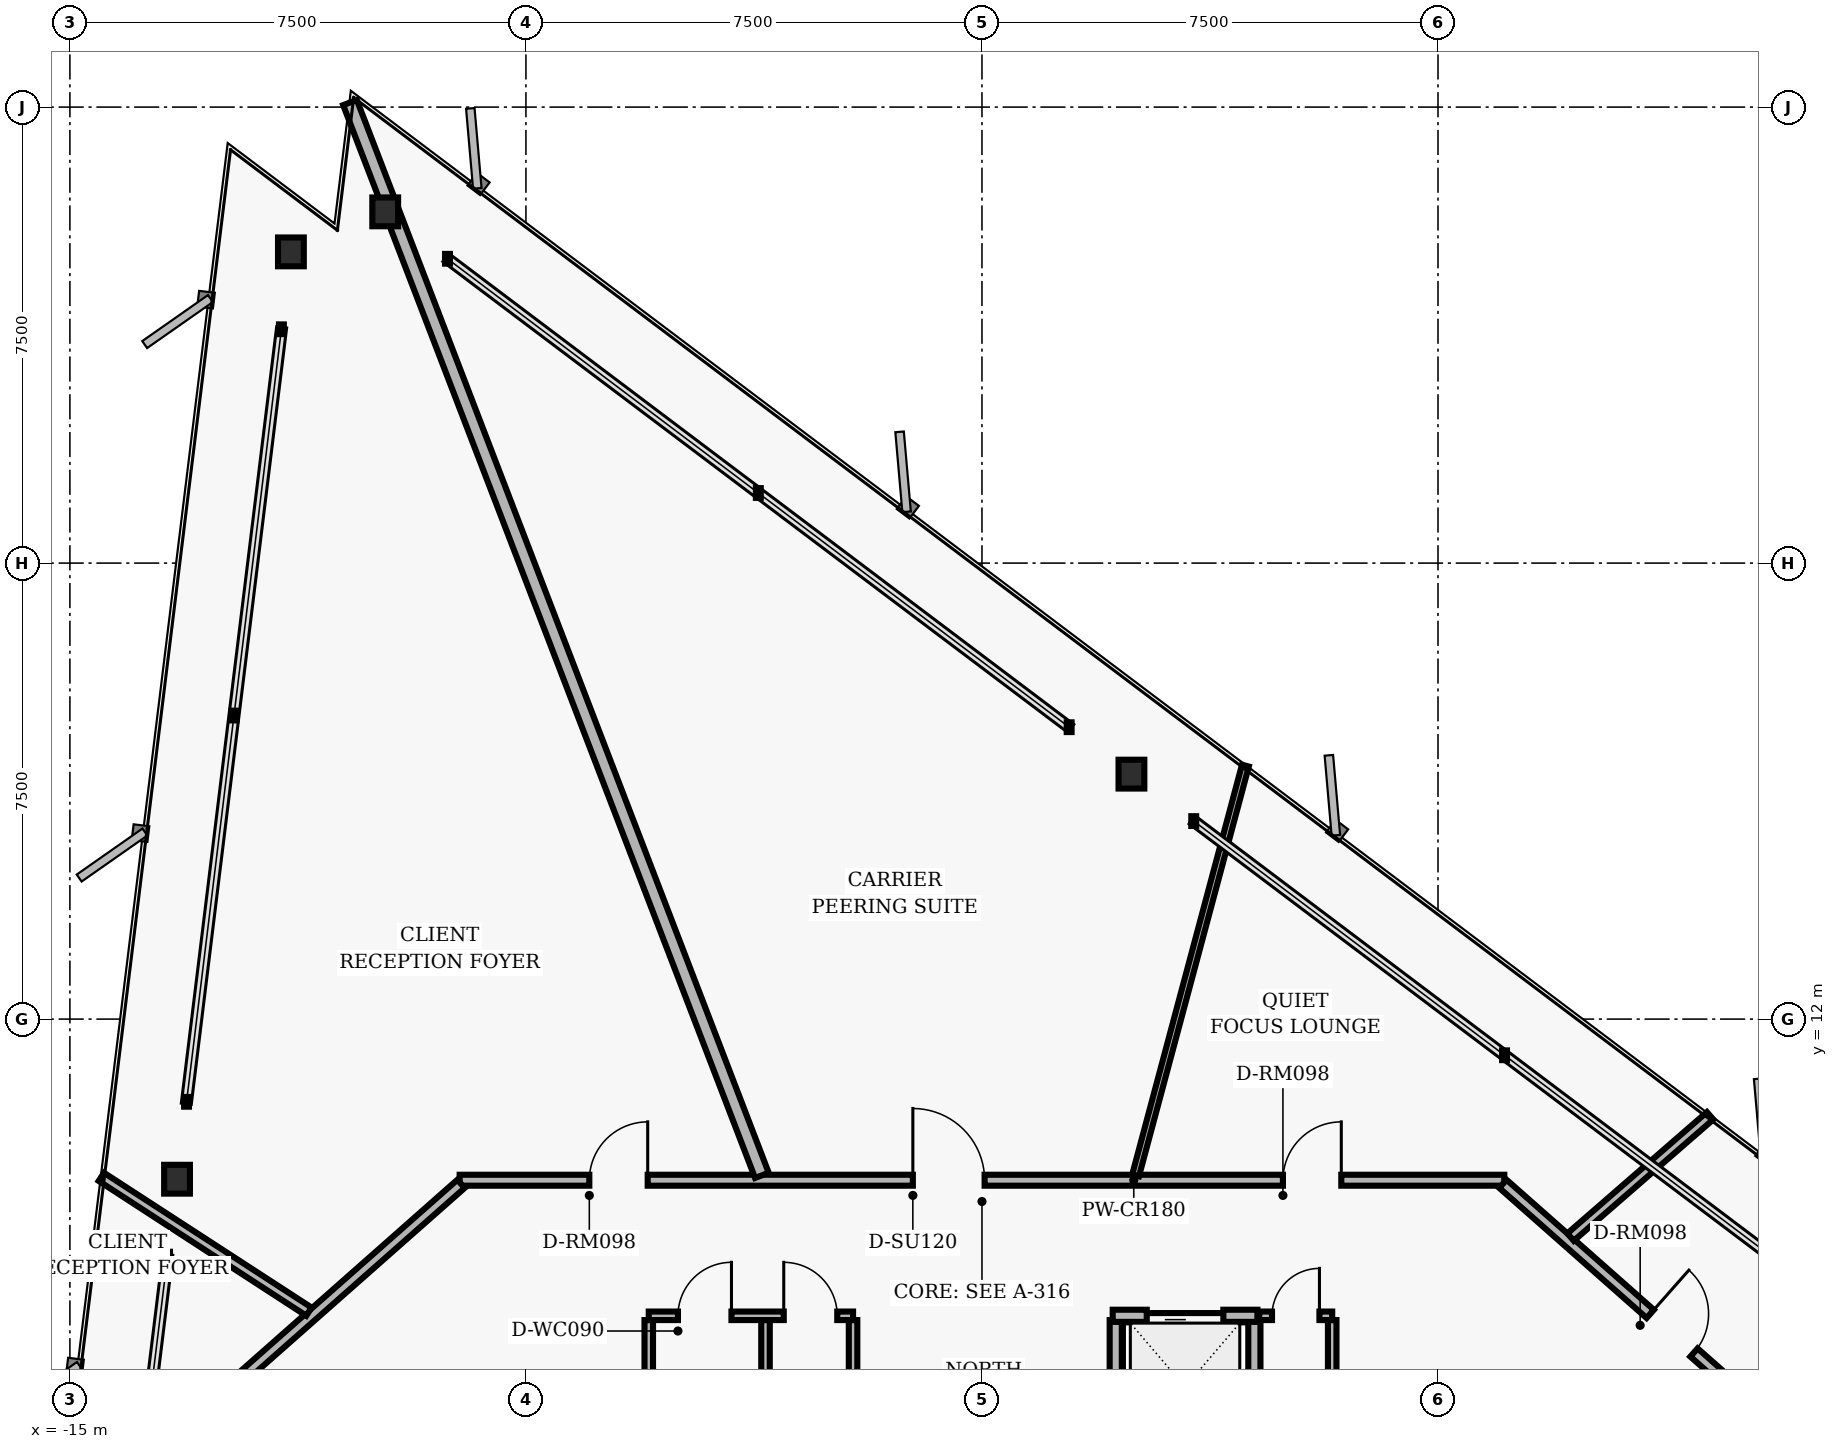
"""IFC4 building model, lengths in metres.
Left out: names, types, materials, properties, quantities, classifications, styles, units other than length and angle.
Written with IfcOpenShell. Run it as: python <this file> out.ifc"""

import sys

from ifc_helpers import new_model, si_unit, direction, frame, frame_2d, origin, origin_2d, place, context, subcontext, project, spatial, rectangle, i_section, extrude, element, fill, save


model = new_model("IFC4")
c1 = context("Model", 3, precision=1e-05, world=origin(), true_north=direction((0.0, 1.0)))
c2 = subcontext(c1, "Body", "Model", "MODEL_VIEW")
j1 = project(units=[si_unit("LENGTHUNIT", "METRE"), si_unit("PLANEANGLEUNIT", "RADIAN")], contexts=[c1])
p1 = place(None, origin())
s1 = spatial("IfcSite", under=j1, at=p1, CompositionType="ELEMENT")
p2 = place(p1, origin())
s2 = spatial("IfcBuilding", under=s1, at=p2, CompositionType="ELEMENT")
p3 = place(p2, frame((0.0, 0.0, 59.68)))
s3 = spatial("IfcBuildingStorey", under=s2, at=p3, CompositionType="ELEMENT", Elevation=59.68)
for number, where, z_axis, x_axis in (
    (1, (2.458, 16.029, 0.0), (0.0, 0.0, 1.0), (1.0, 0.0, 0.0)),
    (2, (-9.814, 25.277, 0.0), (0.0, 0.0, 1.0), (1.0, 0.0, 0.0)),
    (3, (-11.365, 24.619, 0.0), (0.0, 0.0, 1.0), (1.0, 0.0, 0.0)),
    (4, (-13.238, 9.366, 0.0), (0.0, 0.0, 1.0), (1.0, 0.0, 0.0)),
):
    element("IfcColumn", number, at=place(p3, frame(where, z_axis=z_axis, x_axis=x_axis)), inside=s3, PredefinedType="COLUMN", context=c2, shape_type="SweptSolid", body=[
        extrude(i_section(OverallWidth=0.424, OverallDepth=0.474, WebThickness=0.048, FlangeThickness=0.077, FilletRadius=0.025, at=origin_2d()), origin(), (0.0, 0.0, 1.0), 3.36),
    ])
for number, where, z_axis, x_axis in (
    (5, (2.2, 4.95, 0.0), (0.0, 0.0, 1.0), (0.0, 1.0, 0.0)),
    (6, (4.48, 4.95, 0.0), (0.0, 0.0, 1.0), (0.0, 1.0, 0.0)),
):
    element("IfcWall", number, at=place(p3, frame(where, z_axis=z_axis, x_axis=x_axis)), inside=s3, PredefinedType="PARTITIONING", context=c2, shape_type="SweptSolid", body=[
        extrude(rectangle(XDim=2.1, YDim=0.2, at=frame_2d((1.05, 0.0))), origin(), (0.0, 0.0, 1.0), 3.073),
    ])
p4 = place(p3, frame((2.15, 7.12, 0.0), z_axis=(0.0, 0.0, 1.0), x_axis=(1.0, 0.0, 0.0)))
e7 = element("IfcWall", 7, at=p4, inside=s3, PredefinedType="PARTITIONING", context=c2, shape_type="SweptSolid", body=[
    extrude(rectangle(XDim=2.38, YDim=0.2, at=frame_2d((1.19, 0.0))), origin(), (0.0, 0.0, 1.0), 2.587),
])
p5 = place(p4, frame((0.56, 0.0, 0.0)))
e8 = element("IfcOpeningElement", 8, at=p5, cuts=e7, PredefinedType="OPENING", context=c2, shape_type="SweptSolid", body=[
    extrude(rectangle(XDim=1.26, YDim=2.06, at=frame_2d((0.63, 1.03))), frame((0.0, 0.11, 0.0), z_axis=(0.0, -1.0, 0.0), x_axis=(1.0, 0.0, 0.0)), (0.0, 0.0, 1.0), 0.22),
])
for number, where, z_axis, x_axis in (
    (9, (-5.48, 4.95, 0.0), (0.0, 0.0, 1.0), (0.0, 1.0, 0.0)),
    (10, (-3.56, 4.95, 0.0), (0.0, 0.0, 1.0), (0.0, 1.0, 0.0)),
    (11, (-2.12, 4.95, 0.0), (0.0, 0.0, 1.0), (0.0, 1.0, 0.0)),
):
    element("IfcWall", number, at=place(p3, frame(where, z_axis=z_axis, x_axis=x_axis)), inside=s3, PredefinedType="PARTITIONING", context=c2, shape_type="SweptSolid", body=[
        extrude(rectangle(XDim=2.1, YDim=0.14, at=frame_2d((1.05, 0.0))), origin(), (0.0, 0.0, 1.0), 3.073),
    ])
p6 = place(p3, frame((-5.48, 7.12, 0.0), z_axis=(0.0, 0.0, 1.0), x_axis=(1.0, 0.0, 0.0)))
e12 = element("IfcWall", 12, at=p6, inside=s3, PredefinedType="PARTITIONING", context=c2, shape_type="SweptSolid", body=[
    extrude(rectangle(XDim=3.36, YDim=0.14, at=frame_2d((1.68, 0.0))), origin(), (0.0, 0.0, 1.0), 3.073),
])
p7 = place(p6, frame((0.48, 0.0, 0.0)))
e13 = element("IfcOpeningElement", 13, at=p7, cuts=e12, PredefinedType="OPENING", context=c2, shape_type="SweptSolid", body=[
    extrude(rectangle(XDim=0.88, YDim=2.02, at=frame_2d((0.44, 1.01))), frame((0.0, 0.08, 0.0), z_axis=(0.0, -1.0, 0.0), x_axis=(1.0, 0.0, 0.0)), (0.0, 0.0, 1.0), 0.16),
])
p8 = place(p6, frame((2.22, 0.0, 0.0)))
e14 = element("IfcOpeningElement", 14, at=p8, cuts=e12, PredefinedType="OPENING", context=c2, shape_type="SweptSolid", body=[
    extrude(rectangle(XDim=0.88, YDim=2.02, at=frame_2d((0.44, 1.01))), frame((0.0, 0.08, 0.0), z_axis=(0.0, -1.0, 0.0), x_axis=(1.0, 0.0, 0.0)), (0.0, 0.0, 1.0), 0.16),
])
p9 = place(p3, frame((5.76, 4.95, 0.0), z_axis=(0.0, 0.0, 1.0), x_axis=(0.0, 1.0, 0.0)))
e15 = element("IfcWall", 15, at=p9, inside=s3, PredefinedType="PARTITIONING", context=c2, shape_type="SweptSolid", body=[
    extrude(rectangle(XDim=2.1, YDim=0.14, at=frame_2d((1.05, 0.0))), origin(), (0.0, 0.0, 1.0), 3.073),
])
p10 = place(p3, frame((4.56, 7.12, 0.0), z_axis=(0.0, 0.0, 1.0), x_axis=(1.0, 0.0, 0.0)))
e16 = element("IfcWall", 16, at=p10, inside=s3, PredefinedType="PARTITIONING", context=c2, shape_type="SweptSolid", body=[
    extrude(rectangle(XDim=1.2, YDim=0.14, at=frame_2d((0.6, 0.0))), origin(), (0.0, 0.0, 1.0), 2.587),
])
p11 = place(p10, frame((0.21, 0.0, 0.0)))
e17 = element("IfcOpeningElement", 17, at=p11, cuts=e16, PredefinedType="OPENING", context=c2, shape_type="SweptSolid", body=[
    extrude(rectangle(XDim=0.78, YDim=2.01, at=frame_2d((0.39, 1.005))), frame((0.0, 0.08, 0.0), z_axis=(0.0, -1.0, 0.0), x_axis=(1.0, 0.0, 0.0)), (0.0, 0.0, 1.0), 0.16),
])
p12 = place(p3, frame((-8.59, 9.35, 0.0), z_axis=(0.0, 0.0, 1.0), x_axis=(1.0, 0.0, 0.0)))
e18 = element("IfcWall", 18, at=p12, inside=s3, PredefinedType="PARTITIONING", context=c2, shape_type="SweptSolid", body=[
    extrude(rectangle(XDim=17.18, YDim=0.18, at=frame_2d((8.59, 0.0))), origin(), (0.0, 0.0, 1.0), 3.073),
])
p13 = place(p12, frame((13.54, 0.0, 0.0)))
e19 = element("IfcOpeningElement", 19, at=p13, cuts=e18, PredefinedType="OPENING", context=c2, shape_type="SweptSolid", body=[
    extrude(rectangle(XDim=0.96, YDim=2.02, at=frame_2d((0.48, 1.01))), frame((0.0, 0.1, 0.0), z_axis=(0.0, -1.0, 0.0), x_axis=(1.0, 0.0, 0.0)), (0.0, 0.0, 1.0), 0.2),
])
p14 = place(p12, frame((7.453, 0.0, 0.0)))
e20 = element("IfcOpeningElement", 20, at=p14, cuts=e18, PredefinedType="OPENING", context=c2, shape_type="SweptSolid", body=[
    extrude(rectangle(XDim=1.18, YDim=2.02, at=frame_2d((0.59, 1.01))), frame((0.0, 0.1, 0.0), z_axis=(0.0, -1.0, 0.0), x_axis=(1.0, 0.0, 0.0)), (0.0, 0.0, 1.0), 0.2),
])
p15 = place(p12, frame((2.133, 0.0, 0.0)))
e21 = element("IfcOpeningElement", 21, at=p15, cuts=e18, PredefinedType="OPENING", context=c2, shape_type="SweptSolid", body=[
    extrude(rectangle(XDim=0.96, YDim=2.02, at=frame_2d((0.48, 1.01))), frame((0.0, 0.1, 0.0), z_axis=(0.0, -1.0, 0.0), x_axis=(1.0, 0.0, 0.0)), (0.0, 0.0, 1.0), 0.2),
])
p16 = place(p3, frame((8.567, 9.29, 0.0), z_axis=(0.0, 0.0, 1.0), x_axis=(0.749626463267, -0.66186113768, 0.0)))
e22 = element("IfcWall", 22, at=p16, inside=s3, PredefinedType="PARTITIONING", context=c2, shape_type="SweptSolid", body=[
    extrude(rectangle(XDim=6.27, YDim=0.18, at=frame_2d((3.135, 0.0))), origin(), (0.0, 0.0, 1.0), 2.587),
])
p17 = place(p16, frame((3.232, 0.0, 0.0)))
e23 = element("IfcOpeningElement", 23, at=p17, cuts=e22, PredefinedType="OPENING", context=c2, shape_type="SweptSolid", body=[
    extrude(rectangle(XDim=0.96, YDim=2.02, at=frame_2d((0.48, 1.01))), frame((0.0, 0.1, 0.0), z_axis=(0.0, -1.0, 0.0), x_axis=(1.0, 0.0, 0.0)), (0.0, 0.0, 1.0), 0.2),
])
p18 = place(p3, frame((-13.268, 5.14, 0.0), z_axis=(0.0, 0.0, 1.0), x_axis=(0.749626463267, 0.66186113768, 0.0)))
e24 = element("IfcWall", 24, at=p18, inside=s3, PredefinedType="PARTITIONING", context=c2, shape_type="SweptSolid", body=[
    extrude(rectangle(XDim=6.27, YDim=0.18, at=frame_2d((3.135, 0.0))), origin(), (0.0, 0.0, 1.0), 3.073),
])
p19 = place(p3, frame((9.68, 8.415, 0.0), z_axis=(0.0, 0.0, 1.0), x_axis=(0.754716123846, 0.656051501337, 0.0)))
e25 = element("IfcWall", 25, at=p19, inside=s3, PredefinedType="PARTITIONING", context=c2, shape_type="SweptSolid", body=[
    extrude(rectangle(XDim=3.041, YDim=0.16, at=frame_2d((1.521, 0.0))), origin(), (0.0, 0.0, 1.0), 3.073),
])
p20 = place(p3, frame((2.527, 9.43, 0.0), z_axis=(0.0, 0.0, 1.0), x_axis=(0.258803716415, 0.965929933468, 0.0)))
e26 = element("IfcWall", 26, at=p20, inside=s3, PredefinedType="MOVABLE", context=c2, shape_type="SweptSolid", body=[
    extrude(rectangle(XDim=6.977, YDim=0.115, at=frame_2d((3.489, 0.0))), origin(), (0.0, 0.0, 1.0), 3.073),
])
p21 = place(p3, frame((-3.62, 9.43, 0.0), z_axis=(0.0, 0.0, 1.0), x_axis=(-0.358366182081, 0.933581104961, 0.0)))
e27 = element("IfcWall", 27, at=p21, inside=s3, PredefinedType="PARTITIONING", context=c2, shape_type="SweptSolid", body=[
    extrude(rectangle(XDim=18.901, YDim=0.24, at=frame_2d((9.45, 0.0))), origin(), (0.0, 0.0, 1.0), 3.073),
])
p22 = place(p3, frame((-11.069, 7.188, 0.0), z_axis=(0.0, 0.0, 1.0), x_axis=(-0.838653238926, 0.544665718436, 0.0)))
e28 = element("IfcWall", 28, at=p22, inside=s3, PredefinedType="PARTITIONING", context=c2, shape_type="SweptSolid", body=[
    extrude(rectangle(XDim=4.07, YDim=0.16, at=frame_2d((2.035, 0.0))), origin(), (0.0, 0.0, 1.0), 2.358),
])
p23 = place(p5, origin())
e29 = element("IfcDoor", 29, at=p23, inside=s3, OperationType="SLIDING_TO_LEFT", PredefinedType="DOOR", context=c2, shape_type="SweptSolid", body=[
    extrude(rectangle(XDim=1.26, YDim=2.06, at=frame_2d((0.63, 1.03))), frame((0.0, 0.025, 0.0), z_axis=(0.0, -1.0, 0.0), x_axis=(1.0, 0.0, 0.0)), (0.0, 0.0, 1.0), 0.05),
])
fill(e8, e29)
p24 = place(p7, origin())
e30 = element("IfcDoor", 30, at=p24, inside=s3, OperationType="SINGLE_SWING_RIGHT", PredefinedType="DOOR", context=c2, shape_type="SweptSolid", body=[
    extrude(rectangle(XDim=0.88, YDim=2.02, at=frame_2d((0.44, 1.01))), frame((0.0, 0.025, 0.0), z_axis=(0.0, -1.0, 0.0), x_axis=(1.0, 0.0, 0.0)), (0.0, 0.0, 1.0), 0.05),
])
fill(e13, e30)
p25 = place(p8, origin())
e31 = element("IfcDoor", 31, at=p25, inside=s3, OperationType="SINGLE_SWING_LEFT", PredefinedType="DOOR", context=c2, shape_type="SweptSolid", body=[
    extrude(rectangle(XDim=0.88, YDim=2.02, at=frame_2d((0.44, 1.01))), frame((0.0, 0.025, 0.0), z_axis=(0.0, -1.0, 0.0), x_axis=(1.0, 0.0, 0.0)), (0.0, 0.0, 1.0), 0.05),
])
fill(e14, e31)
p26 = place(p11, origin())
e32 = element("IfcDoor", 32, at=p26, inside=s3, OperationType="SINGLE_SWING_RIGHT", PredefinedType="DOOR", context=c2, shape_type="SweptSolid", body=[
    extrude(rectangle(XDim=0.78, YDim=2.01, at=frame_2d((0.39, 1.005))), frame((0.0, 0.025, 0.0), z_axis=(0.0, -1.0, 0.0), x_axis=(1.0, 0.0, 0.0)), (0.0, 0.0, 1.0), 0.05),
])
fill(e17, e32)
p27 = place(p17, origin())
e33 = element("IfcDoor", 33, at=p27, inside=s3, OperationType="SINGLE_SWING_LEFT", PredefinedType="DOOR", context=c2, shape_type="SweptSolid", body=[
    extrude(rectangle(XDim=0.96, YDim=2.02, at=frame_2d((0.48, 1.01))), frame((0.0, 0.025, 0.0), z_axis=(0.0, -1.0, 0.0), x_axis=(1.0, 0.0, 0.0)), (0.0, 0.0, 1.0), 0.05),
])
fill(e23, e33)
p28 = place(p13, origin())
e34 = element("IfcDoor", 34, at=p28, inside=s3, OperationType="SINGLE_SWING_RIGHT", PredefinedType="DOOR", context=c2, shape_type="SweptSolid", body=[
    extrude(rectangle(XDim=0.96, YDim=2.02, at=frame_2d((0.48, 1.01))), frame((0.0, 0.025, 0.0), z_axis=(0.0, -1.0, 0.0), x_axis=(1.0, 0.0, 0.0)), (0.0, 0.0, 1.0), 0.05),
])
fill(e19, e34)
p29 = place(p14, origin())
e35 = element("IfcDoor", 35, at=p29, inside=s3, OperationType="SINGLE_SWING_LEFT", PredefinedType="DOOR", context=c2, shape_type="SweptSolid", body=[
    extrude(rectangle(XDim=1.18, YDim=2.02, at=frame_2d((0.59, 1.01))), frame((0.0, 0.025, 0.0), z_axis=(0.0, -1.0, 0.0), x_axis=(1.0, 0.0, 0.0)), (0.0, 0.0, 1.0), 0.05),
])
fill(e20, e35)
p30 = place(p15, origin())
e36 = element("IfcDoor", 36, at=p30, inside=s3, OperationType="SINGLE_SWING_RIGHT", PredefinedType="DOOR", context=c2, shape_type="SweptSolid", body=[
    extrude(rectangle(XDim=0.96, YDim=2.02, at=frame_2d((0.48, 1.01))), frame((0.0, 0.025, 0.0), z_axis=(0.0, -1.0, 0.0), x_axis=(1.0, 0.0, 0.0)), (0.0, 0.0, 1.0), 0.05),
])
fill(e21, e36)
save(model, sys.argv[1])
